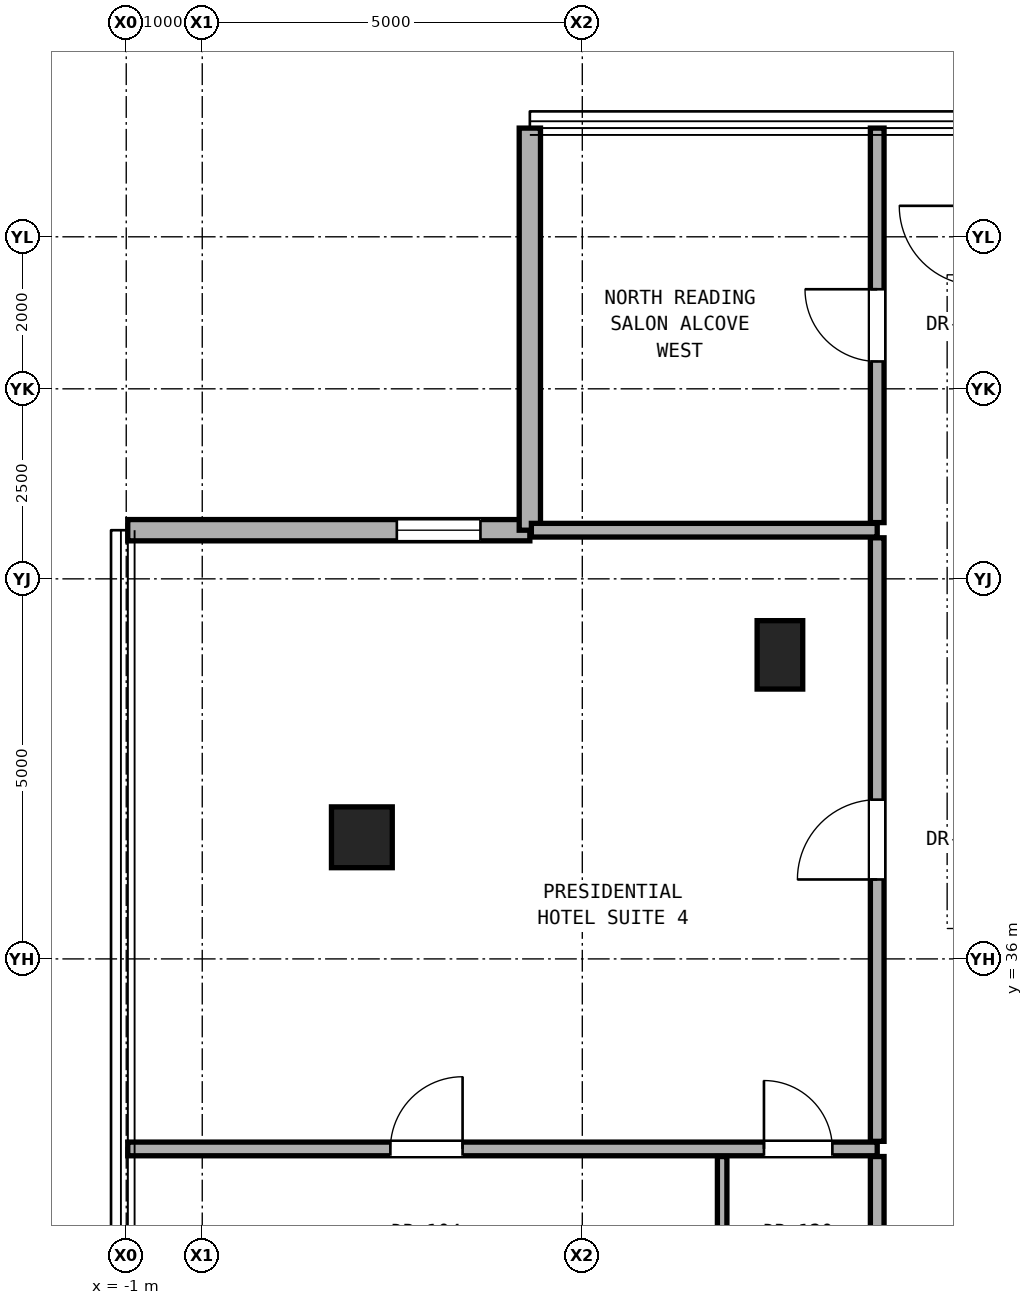
"""IFC4 building model, lengths in metres.
Left out: names, types, materials, properties, quantities, classifications, styles, units other than length and angle.
Written with IfcOpenShell. Run it as: python <this file> out.ifc"""

import sys

from ifc_helpers import new_model, si_unit, direction, frame, frame_2d, origin, origin_2d, place, context, subcontext, project, spatial, rectangle, hollow_rectangle, extrude, element, fill, save


model = new_model("IFC4")
c1 = context("Model", 3, precision=1e-05, world=origin(), true_north=direction((0.0, 1.0)))
c2 = subcontext(c1, "Body", "Model", "MODEL_VIEW")
j1 = project(units=[si_unit("LENGTHUNIT", "METRE"), si_unit("PLANEANGLEUNIT", "RADIAN")], contexts=[c1])
p1 = place(None, origin())
s1 = spatial("IfcSite", under=j1, at=p1, CompositionType="ELEMENT")
p2 = place(p1, origin())
s2 = spatial("IfcBuilding", under=s1, at=p2, CompositionType="ELEMENT")
p3 = place(p2, frame((0.0, 0.0, 235.9)))
s3 = spatial("IfcBuildingStorey", under=s2, at=p3, CompositionType="ELEMENT", Elevation=235.9)
p4 = place(p3, frame((2.1, 37.6, 0.0), z_axis=(0.0, 0.0, 1.0), x_axis=(1.0, 0.0, 0.0)))
e1 = element("IfcColumn", 1, at=p4, inside=s3, PredefinedType="COLUMN", context=c2, shape_type="SweptSolid", body=[
    extrude(hollow_rectangle(XDim=0.8, YDim=0.8, WallThickness=0.045, at=origin_2d()), origin(), (0.0, 0.0, 1.0), 3.3),
])
p5 = place(p3, frame((7.6, 40.0, 0.0), z_axis=(0.0, 0.0, 1.0), x_axis=(1.0, 0.0, 0.0)))
e2 = element("IfcColumn", 2, at=p5, inside=s3, PredefinedType="PILASTER", context=c2, shape_type="SweptSolid", body=[
    extrude(rectangle(XDim=0.6, YDim=0.9, at=origin_2d()), origin(), (0.0, 0.0, 1.0), 3.3),
])
p6 = place(p3, frame((4.31, 41.64, 0.0), z_axis=(0.0, 0.0, 1.0), x_axis=(-1.0, 0.0, 0.0)))
e3 = element("IfcWall", 3, at=p6, inside=s3, PredefinedType="SOLIDWALL", context=c2, shape_type="SweptSolid", body=[
    extrude(rectangle(XDim=5.29, YDim=0.28, at=frame_2d((2.645, 0.0))), origin(), (0.0, 0.0, 1.0), 3.08),
])
p7 = place(p6, frame((0.65, 0.0, 0.85)))
e4 = element("IfcOpeningElement", 4, at=p7, cuts=e3, PredefinedType="OPENING", context=c2, shape_type="SweptSolid", body=[
    extrude(rectangle(XDim=1.1, YDim=2.0, at=frame_2d((0.55, 1.0))), frame((0.0, 0.15, 0.0), z_axis=(0.0, -1.0, 0.0), x_axis=(1.0, 0.0, 0.0)), (0.0, 0.0, 1.0), 0.3),
])
p8 = place(p3, frame((4.31, 46.93, 0.0), z_axis=(0.0, 0.0, 1.0), x_axis=(0.0, -1.0, 0.0)))
e5 = element("IfcWall", 5, at=p8, inside=s3, PredefinedType="SOLIDWALL", context=c2, shape_type="SweptSolid", body=[
    extrude(rectangle(XDim=5.29, YDim=0.28, at=frame_2d((2.645, 0.0))), origin(), (0.0, 0.0, 1.0), 3.08),
])
p9 = place(p3, frame((-0.98, 33.5, 0.0), z_axis=(0.0, 0.0, 1.0), x_axis=(1.0, 0.0, 0.0)))
e6 = element("IfcWall", 6, at=p9, inside=s3, PredefinedType="PARTITIONING", context=c2, shape_type="SweptSolid", body=[
    extrude(rectangle(XDim=9.86, YDim=0.18, at=frame_2d((4.93, 0.0))), origin(), (0.0, 0.0, 1.0), 2.319),
])
p10 = place(p9, frame((3.455, 0.0, 0.0)))
e7 = element("IfcOpeningElement", 7, at=p10, cuts=e6, PredefinedType="OPENING", context=c2, shape_type="SweptSolid", body=[
    extrude(rectangle(XDim=0.95, YDim=2.15, at=frame_2d((0.475, 1.075))), frame((0.0, 0.1, 0.0), z_axis=(0.0, -1.0, 0.0), x_axis=(1.0, 0.0, 0.0)), (0.0, 0.0, 1.0), 0.2),
])
p11 = place(p9, frame((8.37, 0.0, 0.0)))
e8 = element("IfcOpeningElement", 8, at=p11, cuts=e6, PredefinedType="OPENING", context=c2, shape_type="SweptSolid", body=[
    extrude(rectangle(XDim=0.9, YDim=2.1, at=frame_2d((0.45, 1.05))), frame((0.0, 0.1, 0.0), z_axis=(0.0, -1.0, 0.0), x_axis=(1.0, 0.0, 0.0)), (0.0, 0.0, 1.0), 0.2),
])
p12 = place(p3, frame((4.33, 41.64, 0.0), z_axis=(0.0, 0.0, 1.0), x_axis=(1.0, 0.0, 0.0)))
e9 = element("IfcWall", 9, at=p12, inside=s3, PredefinedType="PARTITIONING", context=c2, shape_type="SweptSolid", body=[
    extrude(rectangle(XDim=4.55, YDim=0.18, at=frame_2d((2.275, 0.0))), origin(), (0.0, 0.0, 1.0), 3.1),
])
p13 = place(p3, frame((6.84, 31.272, 0.0), z_axis=(0.0, 0.0, 1.0), x_axis=(0.0, 1.0, 0.0)))
e10 = element("IfcWall", 10, at=p13, inside=s3, PredefinedType="PARTITIONING", context=c2, shape_type="SweptSolid", body=[
    extrude(rectangle(XDim=2.127, YDim=0.125, at=frame_2d((1.064, 0.0))), origin(), (0.0, 0.0, 1.0), 2.396),
])
p14 = place(p3, frame((8.88, 31.272, 0.0), z_axis=(0.0, 0.0, 1.0), x_axis=(0.0, 1.0, 0.0)))
e11 = element("IfcWall", 11, at=p14, inside=s3, PredefinedType="PARTITIONING", context=c2, shape_type="SweptSolid", body=[
    extrude(rectangle(XDim=2.127, YDim=0.18, at=frame_2d((1.064, 0.0))), origin(), (0.0, 0.0, 1.0), 2.396),
])
p15 = place(p3, frame((8.88, 33.6, 0.0), z_axis=(0.0, 0.0, 1.0), x_axis=(0.0, 1.0, 0.0)))
e12 = element("IfcWall", 12, at=p15, inside=s3, PredefinedType="PARTITIONING", context=c2, shape_type="SweptSolid", body=[
    extrude(rectangle(XDim=7.94, YDim=0.18, at=frame_2d((3.97, 0.0))), origin(), (0.0, 0.0, 1.0), 2.492),
])
p16 = place(p15, frame((3.445, 0.0, 0.0)))
e13 = element("IfcOpeningElement", 13, at=p16, cuts=e12, PredefinedType="OPENING", context=c2, shape_type="SweptSolid", body=[
    extrude(rectangle(XDim=1.05, YDim=2.2, at=frame_2d((0.525, 1.1))), frame((0.0, 0.1, 0.0), z_axis=(0.0, -1.0, 0.0), x_axis=(1.0, 0.0, 0.0)), (0.0, 0.0, 1.0), 0.2),
])
p17 = place(p3, frame((8.88, 41.74, 0.0), z_axis=(0.0, 0.0, 1.0), x_axis=(0.0, 1.0, 0.0)))
e14 = element("IfcWall", 14, at=p17, inside=s3, PredefinedType="PARTITIONING", context=c2, shape_type="SweptSolid", body=[
    extrude(rectangle(XDim=5.19, YDim=0.18, at=frame_2d((2.595, 0.0))), origin(), (0.0, 0.0, 1.0), 3.1),
])
p18 = place(p17, frame((2.12, 0.0, 0.0)))
e15 = element("IfcOpeningElement", 15, at=p18, cuts=e14, PredefinedType="OPENING", context=c2, shape_type="SweptSolid", body=[
    extrude(rectangle(XDim=0.95, YDim=2.15, at=frame_2d((0.475, 1.075))), frame((0.0, 0.1, 0.0), z_axis=(0.0, -1.0, 0.0), x_axis=(1.0, 0.0, 0.0)), (0.0, 0.0, 1.0), 0.2),
])
p19 = place(p7, origin())
e16 = element("IfcWindow", 16, at=p19, inside=s3, PartitioningType="SINGLE_PANEL", PredefinedType="WINDOW", context=c2, shape_type="SweptSolid", body=[
    extrude(rectangle(XDim=1.1, YDim=2.0, at=frame_2d((0.55, 1.0))), frame((0.0, 0.03, 0.0), z_axis=(0.0, -1.0, 0.0), x_axis=(1.0, 0.0, 0.0)), (0.0, 0.0, 1.0), 0.06),
])
fill(e4, e16)
p20 = place(p16, origin())
e17 = element("IfcDoor", 17, at=p20, inside=s3, OperationType="SINGLE_SWING_LEFT", PredefinedType="DOOR", context=c2, shape_type="SweptSolid", body=[
    extrude(rectangle(XDim=1.05, YDim=2.2, at=frame_2d((0.525, 1.1))), frame((0.0, 0.025, 0.0), z_axis=(0.0, -1.0, 0.0), x_axis=(1.0, 0.0, 0.0)), (0.0, 0.0, 1.0), 0.05),
])
fill(e13, e17)
p21 = place(p10, origin())
e18 = element("IfcDoor", 18, at=p21, inside=s3, OperationType="SINGLE_SWING_RIGHT", PredefinedType="DOOR", context=c2, shape_type="SweptSolid", body=[
    extrude(rectangle(XDim=0.95, YDim=2.15, at=frame_2d((0.475, 1.075))), frame((0.0, 0.025, 0.0), z_axis=(0.0, -1.0, 0.0), x_axis=(1.0, 0.0, 0.0)), (0.0, 0.0, 1.0), 0.05),
])
fill(e7, e18)
p22 = place(p11, origin())
e19 = element("IfcDoor", 19, at=p22, inside=s3, OperationType="SINGLE_SWING_LEFT", PredefinedType="DOOR", context=c2, shape_type="SweptSolid", body=[
    extrude(rectangle(XDim=0.9, YDim=2.1, at=frame_2d((0.45, 1.05))), frame((0.0, 0.025, 0.0), z_axis=(0.0, -1.0, 0.0), x_axis=(1.0, 0.0, 0.0)), (0.0, 0.0, 1.0), 0.05),
])
fill(e8, e19)
p23 = place(p18, origin())
e20 = element("IfcDoor", 20, at=p23, inside=s3, OperationType="SINGLE_SWING_RIGHT", PredefinedType="DOOR", context=c2, shape_type="SweptSolid", body=[
    extrude(rectangle(XDim=0.95, YDim=2.15, at=frame_2d((0.475, 1.075))), frame((0.0, 0.025, 0.0), z_axis=(0.0, -1.0, 0.0), x_axis=(1.0, 0.0, 0.0)), (0.0, 0.0, 1.0), 0.05),
])
fill(e15, e20)
save(model, sys.argv[1])
